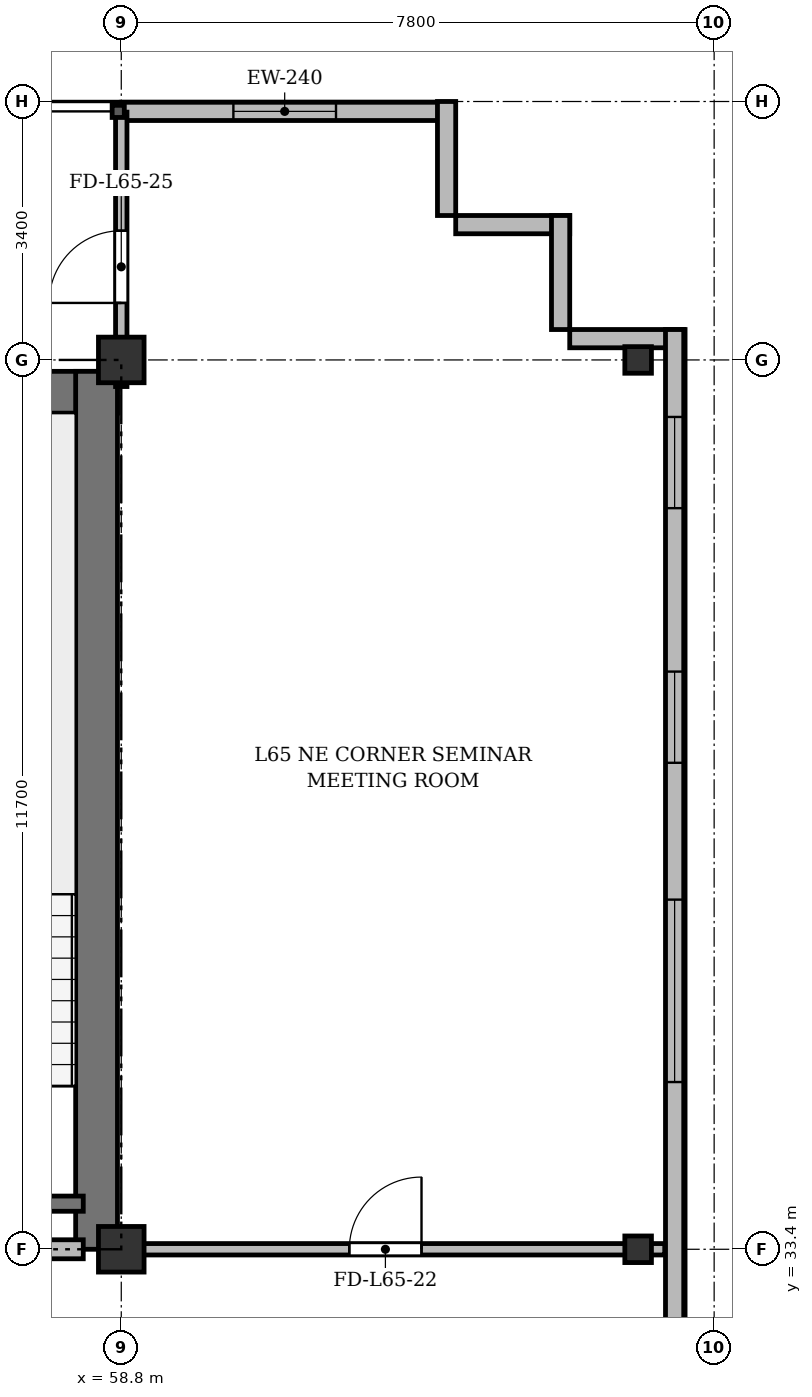
"""IFC4 building model, lengths in metres.
Left out: names, types, materials, properties, quantities, classifications, styles, units other than length and angle.
Written with IfcOpenShell. Run it as: python <this file> out.ifc"""

import sys

from ifc_helpers import new_model, si_unit, direction, frame, frame_2d, origin, origin_2d, place, context, subcontext, project, spatial, rectangle, i_section, extrude, source, transform, mapped, element, fill, save


model = new_model("IFC4")
c1 = context("Model", 3, precision=1e-05, world=origin(), true_north=direction((0.0, 1.0)))
c2 = subcontext(c1, "Body", "Model", "MODEL_VIEW")
j1 = project(units=[si_unit("LENGTHUNIT", "METRE"), si_unit("PLANEANGLEUNIT", "RADIAN")], contexts=[c1])
p1 = place(None, origin())
s1 = spatial("IfcSite", under=j1, at=p1, CompositionType="ELEMENT")
p2 = place(p1, origin())
s2 = spatial("IfcBuilding", under=s1, at=p2, CompositionType="ELEMENT")
p3 = place(p2, frame((0.0, 0.0, 252.3)))
s3 = spatial("IfcBuildingStorey", under=s2, at=p3, CompositionType="ELEMENT", Elevation=252.3)
m1 = source(origin(), c2, "Body", "SweptSolid", [
    extrude(rectangle(XDim=0.6, YDim=0.6, at=origin_2d()), origin(), (0.0, 0.0, 1.0), 3.6),
])
for number, where, z_axis, x_axis in (
    (1, (58.8, 33.4, 0.0), (0.0, 0.0, 1.0), (1.0, 0.0, 0.0)),
    (2, (58.8, 45.1, 0.0), (0.0, 0.0, 1.0), (1.0, 0.0, 0.0)),
):
    element("IfcColumn", number, at=place(p3, frame(where, z_axis=z_axis, x_axis=x_axis)), inside=s3, PredefinedType="COLUMN", context=c2, shape_type="MappedRepresentation", body=[
        mapped(m1, transform((0.0, 0.0, 0.0), x_axis=(1.0, 0.0, 0.0), y_axis=(0.0, 1.0, 0.0), z_axis=(0.0, 0.0, 1.0), scale=1.0)),
    ])
m2 = source(origin(), c2, "Body", "SweptSolid", [
    extrude(i_section(OverallWidth=0.35, OverallDepth=0.35, WebThickness=0.018, FlangeThickness=0.028, at=origin_2d()), origin(), (0.0, 0.0, 1.0), 3.6),
])
for number, where, z_axis, x_axis in (
    (3, (65.6, 33.4, 0.0), (0.0, 0.0, 1.0), (1.0, 0.0, 0.0)),
    (4, (65.6, 45.1, 0.0), (0.0, 0.0, 1.0), (1.0, 0.0, 0.0)),
):
    element("IfcColumn", number, at=place(p3, frame(where, z_axis=z_axis, x_axis=x_axis)), inside=s3, PredefinedType="COLUMN", context=c2, shape_type="MappedRepresentation", body=[
        mapped(m2, transform((0.0, 0.0, 0.0), x_axis=(1.0, 0.0, 0.0), y_axis=(0.0, 1.0, 0.0), z_axis=(0.0, 0.0, 1.0), scale=1.0)),
    ])
p4 = place(p3, frame((58.8, 48.37, 0.0), z_axis=(0.0, 0.0, 1.0), x_axis=(1.0, 0.0, 0.0)))
e5 = element("IfcWall", 5, at=p4, inside=s3, PredefinedType="SOLIDWALL", context=c2, shape_type="SweptSolid", body=[
    extrude(rectangle(XDim=4.3, YDim=0.24, at=frame_2d((2.15, 0.0))), origin(), (0.0, 0.0, 1.0), 3.37),
])
p5 = place(p4, frame((1.475, 0.0, 0.9)))
e6 = element("IfcOpeningElement", 6, at=p5, cuts=e5, PredefinedType="OPENING", context=c2, shape_type="SweptSolid", body=[
    extrude(rectangle(XDim=1.35, YDim=1.5, at=frame_2d((0.675, 0.75))), frame((0.0, 0.13, 0.0), z_axis=(0.0, -1.0, 0.0), x_axis=(1.0, 0.0, 0.0)), (0.0, 0.0, 1.0), 0.26),
])
for number, where, z_axis, x_axis in (
    (7, (63.08, 48.5, 0.0), (0.0, 0.0, 1.0), (0.0, -1.0, 0.0)),
    (8, (63.2, 46.88, 0.0), (0.0, 0.0, 1.0), (1.0, 0.0, 0.0)),
    (9, (64.58, 47.0, 0.0), (0.0, 0.0, 1.0), (0.0, -1.0, 0.0)),
    (10, (64.7, 45.38, 0.0), (0.0, 0.0, 1.0), (1.0, 0.0, 0.0)),
):
    element("IfcWall", number, at=place(p3, frame(where, z_axis=z_axis, x_axis=x_axis)), inside=s3, PredefinedType="SOLIDWALL", context=c2, shape_type="SweptSolid", body=[
        extrude(rectangle(XDim=1.5, YDim=0.24, at=frame_2d((0.75, 0.0))), origin(), (0.0, 0.0, 1.0), 3.37),
    ])
p6 = place(p3, frame((66.08, 45.5, 0.0), z_axis=(0.0, 0.0, 1.0), x_axis=(0.0, -1.0, 0.0)))
e11 = element("IfcWall", 11, at=p6, inside=s3, PredefinedType="SOLIDWALL", context=c2, shape_type="SweptSolid", body=[
    extrude(rectangle(XDim=39.0, YDim=0.24, at=frame_2d((19.5, 0.0))), origin(), (0.0, 0.0, 1.0), 3.37),
])
p7 = place(p6, frame((36.35, 0.0, 0.92)))
e12 = element("IfcOpeningElement", 12, at=p7, cuts=e11, PredefinedType="OPENING", context=c2, shape_type="SweptSolid", body=[
    extrude(rectangle(XDim=1.2, YDim=1.65, at=frame_2d((0.6, 0.825))), frame((0.0, 0.13, 0.0), z_axis=(0.0, -1.0, 0.0), x_axis=(1.0, 0.0, 0.0)), (0.0, 0.0, 1.0), 0.26),
])
p8 = place(p6, frame((32.9, 0.0, 0.92)))
e13 = element("IfcOpeningElement", 13, at=p8, cuts=e11, PredefinedType="OPENING", context=c2, shape_type="SweptSolid", body=[
    extrude(rectangle(XDim=2.4, YDim=2.1, at=frame_2d((1.2, 1.05))), frame((0.0, 0.13, 0.0), z_axis=(0.0, -1.0, 0.0), x_axis=(1.0, 0.0, 0.0)), (0.0, 0.0, 1.0), 0.26),
])
p9 = place(p6, frame((28.7, 0.0, 0.92)))
e14 = element("IfcOpeningElement", 14, at=p9, cuts=e11, PredefinedType="OPENING", context=c2, shape_type="SweptSolid", body=[
    extrude(rectangle(XDim=2.4, YDim=2.1, at=frame_2d((1.2, 1.05))), frame((0.0, 0.13, 0.0), z_axis=(0.0, -1.0, 0.0), x_axis=(1.0, 0.0, 0.0)), (0.0, 0.0, 1.0), 0.26),
])
p10 = place(p6, frame((21.5, 0.0, 0.92)))
e15 = element("IfcOpeningElement", 15, at=p10, cuts=e11, PredefinedType="OPENING", context=c2, shape_type="SweptSolid", body=[
    extrude(rectangle(XDim=2.4, YDim=2.1, at=frame_2d((1.2, 1.05))), frame((0.0, 0.13, 0.0), z_axis=(0.0, -1.0, 0.0), x_axis=(1.0, 0.0, 0.0)), (0.0, 0.0, 1.0), 0.26),
])
p11 = place(p6, frame((7.5, 0.0, 0.92)))
e16 = element("IfcOpeningElement", 16, at=p11, cuts=e11, PredefinedType="OPENING", context=c2, shape_type="SweptSolid", body=[
    extrude(rectangle(XDim=2.4, YDim=2.1, at=frame_2d((1.2, 1.05))), frame((0.0, 0.13, 0.0), z_axis=(0.0, -1.0, 0.0), x_axis=(1.0, 0.0, 0.0)), (0.0, 0.0, 1.0), 0.26),
])
p12 = place(p6, frame((4.5, 0.0, 0.92)))
e17 = element("IfcOpeningElement", 17, at=p12, cuts=e11, PredefinedType="OPENING", context=c2, shape_type="SweptSolid", body=[
    extrude(rectangle(XDim=1.2, YDim=1.65, at=frame_2d((0.6, 0.825))), frame((0.0, 0.13, 0.0), z_axis=(0.0, -1.0, 0.0), x_axis=(1.0, 0.0, 0.0)), (0.0, 0.0, 1.0), 0.26),
])
p13 = place(p6, frame((1.15, 0.0, 0.92)))
e18 = element("IfcOpeningElement", 18, at=p13, cuts=e11, PredefinedType="OPENING", context=c2, shape_type="SweptSolid", body=[
    extrude(rectangle(XDim=1.2, YDim=1.65, at=frame_2d((0.6, 0.825))), frame((0.0, 0.13, 0.0), z_axis=(0.0, -1.0, 0.0), x_axis=(1.0, 0.0, 0.0)), (0.0, 0.0, 1.0), 0.26),
])
p14 = place(p3, frame((15.65, 44.675, 0.0), z_axis=(0.0, 0.0, 1.0), x_axis=(1.0, 0.0, 0.0)))
e19 = element("IfcWall", 19, at=p14, inside=s3, PredefinedType="SHEAR", context=c2, shape_type="SweptSolid", body=[
    extrude(rectangle(XDim=43.1, YDim=0.55, at=frame_2d((21.55, 0.0))), origin(), (0.0, 0.0, 1.0), 3.37),
])
p15 = place(p3, frame((58.475, 33.4, 0.0), z_axis=(0.0, 0.0, 1.0), x_axis=(0.0, 1.0, 0.0)))
e20 = element("IfcWall", 20, at=p15, inside=s3, PredefinedType="SHEAR", context=c2, shape_type="SweptSolid", body=[
    extrude(rectangle(XDim=11.55, YDim=0.55, at=frame_2d((5.775, 0.0))), origin(), (0.0, 0.0, 1.0), 3.37),
])
p16 = place(p3, frame((54.9, 34.0, 0.0), z_axis=(0.0, 0.0, 1.0), x_axis=(1.0, 0.0, 0.0)))
e21 = element("IfcWall", 21, at=p16, inside=s3, PredefinedType="SHEAR", context=c2, shape_type="SweptSolid", body=[
    extrude(rectangle(XDim=3.4, YDim=0.2, at=frame_2d((1.7, 0.0))), origin(), (0.0, 0.0, 1.0), 3.37),
])
p17 = place(p3, frame((47.15, 33.4, 0.0), z_axis=(0.0, 0.0, 1.0), x_axis=(1.0, 0.0, 0.0)))
e22 = element("IfcWall", 22, at=p17, inside=s3, PredefinedType="PARTITIONING", context=c2, shape_type="SweptSolid", body=[
    extrude(rectangle(XDim=11.15, YDim=0.25, at=frame_2d((5.575, 0.0))), origin(), (0.0, 0.0, 1.0), 2.92),
])
p18 = place(p17, frame((0.7, 0.0, 0.0)))
e23 = element("IfcOpeningElement", 23, at=p18, cuts=e22, PredefinedType="OPENING", context=c2, shape_type="SweptSolid", body=[
    extrude(rectangle(XDim=0.95, YDim=2.15, at=frame_2d((0.475, 1.075))), frame((0.0, 0.135, 0.0), z_axis=(0.0, -1.0, 0.0), x_axis=(1.0, 0.0, 0.0)), (0.0, 0.0, 1.0), 0.27),
])
p19 = place(p17, frame((6.0, 0.0, 0.0)))
e24 = element("IfcOpeningElement", 24, at=p19, cuts=e22, PredefinedType="OPENING", context=c2, shape_type="SweptSolid", body=[
    extrude(rectangle(XDim=1.2, YDim=2.15, at=frame_2d((0.6, 1.075))), frame((0.0, 0.135, 0.0), z_axis=(0.0, -1.0, 0.0), x_axis=(1.0, 0.0, 0.0)), (0.0, 0.0, 1.0), 0.27),
])
p20 = place(p3, frame((58.8, 33.4, 0.0), z_axis=(0.0, 0.0, 1.0), x_axis=(1.0, 0.0, 0.0)))
e25 = element("IfcWall", 25, at=p20, inside=s3, PredefinedType="PARTITIONING", context=c2, shape_type="SweptSolid", body=[
    extrude(rectangle(XDim=7.15, YDim=0.15, at=frame_2d((3.575, 0.0))), origin(), (0.0, 0.0, 1.0), 2.92),
])
p21 = place(p20, frame((3.0, 0.0, 0.0)))
e26 = element("IfcOpeningElement", 26, at=p21, cuts=e25, PredefinedType="OPENING", context=c2, shape_type="SweptSolid", body=[
    extrude(rectangle(XDim=0.95, YDim=2.15, at=frame_2d((0.475, 1.075))), frame((0.0, 0.085, 0.0), z_axis=(0.0, -1.0, 0.0), x_axis=(1.0, 0.0, 0.0)), (0.0, 0.0, 1.0), 0.17),
])
p22 = place(p3, frame((58.8, 44.75, 0.0), z_axis=(0.0, 0.0, 1.0), x_axis=(0.0, 1.0, 0.0)))
e27 = element("IfcWall", 27, at=p22, inside=s3, PredefinedType="PARTITIONING", context=c2, shape_type="SweptSolid", body=[
    extrude(rectangle(XDim=3.61, YDim=0.15, at=frame_2d((1.805, 0.0))), origin(), (0.0, 0.0, 1.0), 2.87),
])
p23 = place(p22, frame((1.1, 0.0, 0.0)))
e28 = element("IfcOpeningElement", 28, at=p23, cuts=e27, PredefinedType="OPENING", context=c2, shape_type="SweptSolid", body=[
    extrude(rectangle(XDim=0.95, YDim=2.15, at=frame_2d((0.475, 1.075))), frame((0.0, 0.085, 0.0), z_axis=(0.0, -1.0, 0.0), x_axis=(1.0, 0.0, 0.0)), (0.0, 0.0, 1.0), 0.17),
])
m3 = source(origin(), c2, "Body", "SweptSolid", [
    extrude(rectangle(XDim=1.35, YDim=1.5, at=frame_2d((0.675, 0.75))), frame((0.0, 0.03, 0.0), z_axis=(0.0, -1.0, 0.0), x_axis=(1.0, 0.0, 0.0)), (0.0, 0.0, 1.0), 0.06),
])
p24 = place(p5, origin())
e29 = element("IfcWindow", 29, at=p24, inside=s3, PartitioningType="SINGLE_PANEL", PredefinedType="WINDOW", context=c2, shape_type="MappedRepresentation", body=[
    mapped(m3, transform((0.0, 0.0, 0.0), x_axis=(1.0, 0.0, 0.0), y_axis=(0.0, 1.0, 0.0), z_axis=(0.0, 0.0, 1.0), scale=1.0)),
])
fill(e6, e29)
m4 = source(origin(), c2, "Body", "SweptSolid", [
    extrude(rectangle(XDim=2.4, YDim=2.1, at=frame_2d((1.2, 1.05))), frame((0.0, 0.03, 0.0), z_axis=(0.0, -1.0, 0.0), x_axis=(1.0, 0.0, 0.0)), (0.0, 0.0, 1.0), 0.06),
])
p25 = place(p11, origin())
e30 = element("IfcWindow", 30, at=p25, inside=s3, PartitioningType="SINGLE_PANEL", PredefinedType="WINDOW", context=c2, shape_type="MappedRepresentation", body=[
    mapped(m4, transform((0.0, 0.0, 0.0), x_axis=(1.0, 0.0, 0.0), y_axis=(0.0, 1.0, 0.0), z_axis=(0.0, 0.0, 1.0), scale=1.0)),
])
fill(e16, e30)
m5 = source(origin(), c2, "Body", "SweptSolid", [
    extrude(rectangle(XDim=1.2, YDim=1.65, at=frame_2d((0.6, 0.825))), frame((0.0, 0.03, 0.0), z_axis=(0.0, -1.0, 0.0), x_axis=(1.0, 0.0, 0.0)), (0.0, 0.0, 1.0), 0.06),
])
p26 = place(p12, origin())
e31 = element("IfcWindow", 31, at=p26, inside=s3, PartitioningType="SINGLE_PANEL", PredefinedType="WINDOW", context=c2, shape_type="MappedRepresentation", body=[
    mapped(m5, transform((0.0, 0.0, 0.0), x_axis=(1.0, 0.0, 0.0), y_axis=(0.0, 1.0, 0.0), z_axis=(0.0, 0.0, 1.0), scale=1.0)),
])
fill(e17, e31)
p27 = place(p13, origin())
e32 = element("IfcWindow", 32, at=p27, inside=s3, PartitioningType="SINGLE_PANEL", PredefinedType="WINDOW", context=c2, shape_type="MappedRepresentation", body=[
    mapped(m5, transform((0.0, 0.0, 0.0), x_axis=(1.0, 0.0, 0.0), y_axis=(0.0, 1.0, 0.0), z_axis=(0.0, 0.0, 1.0), scale=1.0)),
])
fill(e18, e32)
m6 = source(origin(), c2, "Body", "SweptSolid", [
    extrude(rectangle(XDim=0.95, YDim=2.15, at=frame_2d((0.475, 1.075))), frame((0.0, 0.025, 0.0), z_axis=(0.0, -1.0, 0.0), x_axis=(1.0, 0.0, 0.0)), (0.0, 0.0, 1.0), 0.05),
])
p28 = place(p21, origin())
e33 = element("IfcDoor", 33, at=p28, inside=s3, OperationType="SINGLE_SWING_RIGHT", PredefinedType="DOOR", context=c2, shape_type="MappedRepresentation", body=[
    mapped(m6, transform((0.0, 0.0, 0.0), x_axis=(1.0, 0.0, 0.0), y_axis=(0.0, 1.0, 0.0), z_axis=(0.0, 0.0, 1.0), scale=1.0)),
])
fill(e26, e33)
p29 = place(p23, origin())
e34 = element("IfcDoor", 34, at=p29, inside=s3, OperationType="SINGLE_SWING_LEFT", PredefinedType="DOOR", context=c2, shape_type="MappedRepresentation", body=[
    mapped(m6, transform((0.0, 0.0, 0.0), x_axis=(1.0, 0.0, 0.0), y_axis=(0.0, 1.0, 0.0), z_axis=(0.0, 0.0, 1.0), scale=1.0)),
])
fill(e28, e34)
save(model, sys.argv[1])
